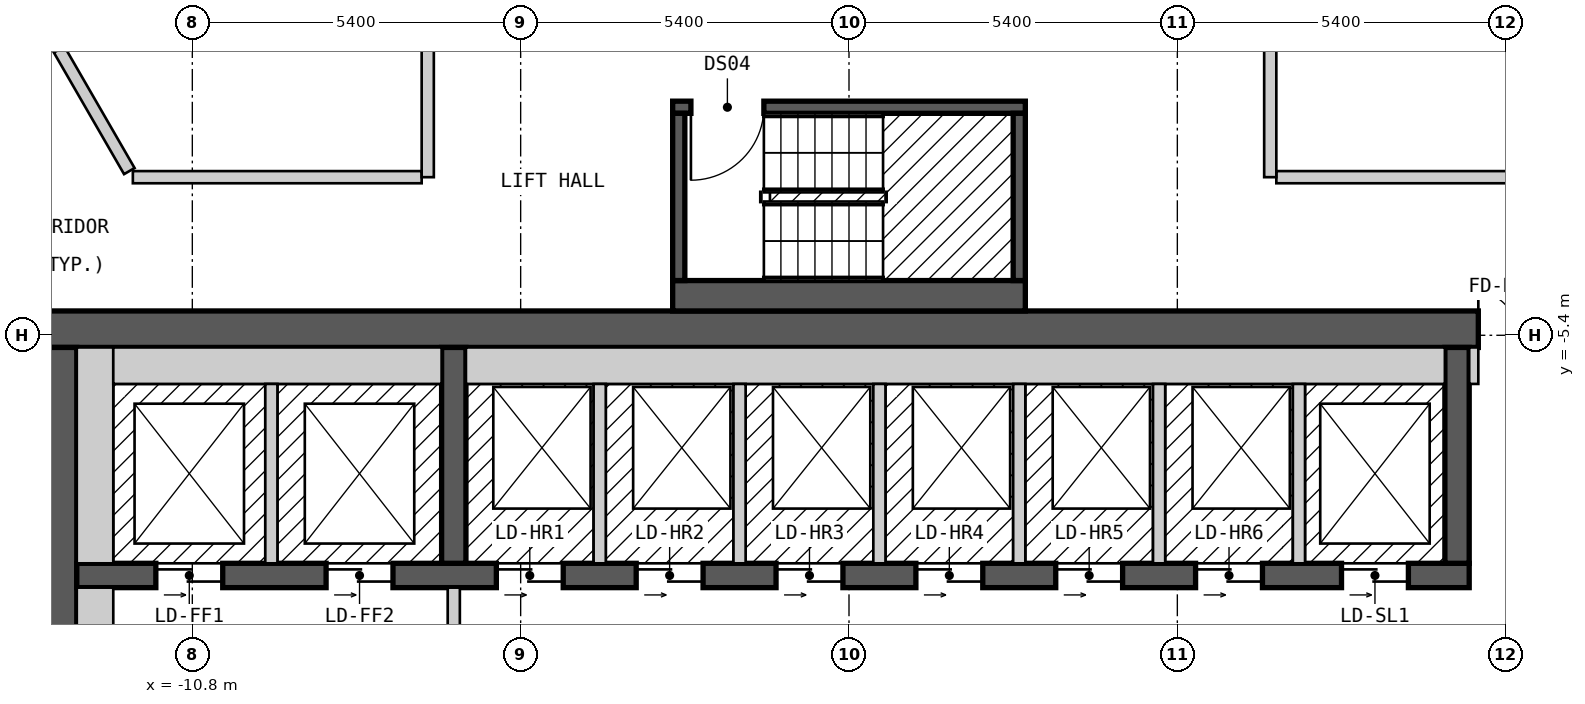
"""IFC4 building model, lengths in metres.
Left out: names, types, materials, properties, quantities, classifications, styles, units other than length and angle.
Written with IfcOpenShell. Run it as: python <this file> out.ifc"""

import sys

from ifc_helpers import new_model, si_unit, direction, frame, frame_2d, origin, place, context, subcontext, project, spatial, rectangle, extrude, element, fill, save


model = new_model("IFC4")
c1 = context("Model", 3, precision=1e-05, world=origin(), true_north=direction((0.0, 1.0)))
c2 = subcontext(c1, "Body", "Model", "MODEL_VIEW")
j1 = project(units=[si_unit("LENGTHUNIT", "METRE"), si_unit("PLANEANGLEUNIT", "RADIAN")], contexts=[c1])
p1 = place(None, origin())
s1 = spatial("IfcSite", under=j1, at=p1, CompositionType="ELEMENT")
p2 = place(p1, origin())
s2 = spatial("IfcBuilding", under=s1, at=p2, CompositionType="ELEMENT")
p3 = place(p2, frame((0.0, 0.0, 196.2)))
s3 = spatial("IfcBuildingStorey", under=s2, at=p3, CompositionType="ELEMENT", Elevation=196.2)
p4 = place(p3, frame((-13.3, -5.3, 0.0), z_axis=(0.0, 0.0, 1.0), x_axis=(1.0, 0.0, 0.0)))
e1 = element("IfcWall", 1, at=p4, inside=s3, PredefinedType="SHEAR", context=c2, shape_type="SweptSolid", body=[
    extrude(rectangle(XDim=26.6, YDim=0.6, at=frame_2d((13.3, 0.0))), origin(), (0.0, 0.0, 1.0), 2.6),
])
p5 = place(p4, frame((23.65, 0.0, 0.0)))
e2 = element("IfcOpeningElement", 2, at=p5, cuts=e1, PredefinedType="OPENING", context=c2, shape_type="SweptSolid", body=[
    extrude(rectangle(XDim=1.2, YDim=2.1, at=frame_2d((0.6, 1.05))), frame((0.0, 0.31, 0.0), z_axis=(0.0, -1.0, 0.0), x_axis=(1.0, 0.0, 0.0)), (0.0, 0.0, 1.0), 0.62),
])
p6 = place(p3, frame((-13.0, -18.4, 0.0), z_axis=(0.0, 0.0, 1.0), x_axis=(0.0, 1.0, 0.0)))
e3 = element("IfcWall", 3, at=p6, inside=s3, PredefinedType="SHEAR", context=c2, shape_type="SweptSolid", body=[
    extrude(rectangle(XDim=12.8, YDim=0.6, at=frame_2d((6.4, 0.0))), origin(), (0.0, 0.0, 1.0), 2.6),
])
p7 = place(p6, frame((4.2, 0.0, 0.0)))
e4 = element("IfcOpeningElement", 4, at=p7, cuts=e3, PredefinedType="OPENING", context=c2, shape_type="SweptSolid", body=[
    extrude(rectangle(XDim=1.2, YDim=2.1, at=frame_2d((0.6, 1.05))), frame((0.0, 0.31, 0.0), z_axis=(0.0, -1.0, 0.0), x_axis=(1.0, 0.0, 0.0)), (0.0, 0.0, 1.0), 0.62),
])
p8 = place(p3, frame((-12.7, -9.35, 0.0), z_axis=(0.0, 0.0, 1.0), x_axis=(1.0, 0.0, 0.0)))
e5 = element("IfcWall", 5, at=p8, inside=s3, PredefinedType="SHEAR", context=c2, shape_type="SweptSolid", body=[
    extrude(rectangle(XDim=22.9, YDim=0.4, at=frame_2d((11.45, 0.0))), origin(), (0.0, 0.0, 1.0), 2.6),
])
p9 = place(p8, frame((1.3, 0.0, 0.0)))
e6 = element("IfcOpeningElement", 6, at=p9, cuts=e5, PredefinedType="OPENING", context=c2, shape_type="SweptSolid", body=[
    extrude(rectangle(XDim=1.1, YDim=2.1, at=frame_2d((0.55, 1.05))), frame((0.0, 0.21, 0.0), z_axis=(0.0, -1.0, 0.0), x_axis=(1.0, 0.0, 0.0)), (0.0, 0.0, 1.0), 0.42),
])
p10 = place(p8, frame((4.1, 0.0, 0.0)))
e7 = element("IfcOpeningElement", 7, at=p10, cuts=e5, PredefinedType="OPENING", context=c2, shape_type="SweptSolid", body=[
    extrude(rectangle(XDim=1.1, YDim=2.1, at=frame_2d((0.55, 1.05))), frame((0.0, 0.21, 0.0), z_axis=(0.0, -1.0, 0.0), x_axis=(1.0, 0.0, 0.0)), (0.0, 0.0, 1.0), 0.42),
])
p11 = place(p8, frame((6.9, 0.0, 0.0)))
e8 = element("IfcOpeningElement", 8, at=p11, cuts=e5, PredefinedType="OPENING", context=c2, shape_type="SweptSolid", body=[
    extrude(rectangle(XDim=1.1, YDim=2.1, at=frame_2d((0.55, 1.05))), frame((0.0, 0.21, 0.0), z_axis=(0.0, -1.0, 0.0), x_axis=(1.0, 0.0, 0.0)), (0.0, 0.0, 1.0), 0.42),
])
p12 = place(p8, frame((9.2, 0.0, 0.0)))
e9 = element("IfcOpeningElement", 9, at=p12, cuts=e5, PredefinedType="OPENING", context=c2, shape_type="SweptSolid", body=[
    extrude(rectangle(XDim=1.1, YDim=2.1, at=frame_2d((0.55, 1.05))), frame((0.0, 0.21, 0.0), z_axis=(0.0, -1.0, 0.0), x_axis=(1.0, 0.0, 0.0)), (0.0, 0.0, 1.0), 0.42),
])
p13 = place(p8, frame((11.5, 0.0, 0.0)))
e10 = element("IfcOpeningElement", 10, at=p13, cuts=e5, PredefinedType="OPENING", context=c2, shape_type="SweptSolid", body=[
    extrude(rectangle(XDim=1.1, YDim=2.1, at=frame_2d((0.55, 1.05))), frame((0.0, 0.21, 0.0), z_axis=(0.0, -1.0, 0.0), x_axis=(1.0, 0.0, 0.0)), (0.0, 0.0, 1.0), 0.42),
])
p14 = place(p8, frame((13.8, 0.0, 0.0)))
e11 = element("IfcOpeningElement", 11, at=p14, cuts=e5, PredefinedType="OPENING", context=c2, shape_type="SweptSolid", body=[
    extrude(rectangle(XDim=1.1, YDim=2.1, at=frame_2d((0.55, 1.05))), frame((0.0, 0.21, 0.0), z_axis=(0.0, -1.0, 0.0), x_axis=(1.0, 0.0, 0.0)), (0.0, 0.0, 1.0), 0.42),
])
p15 = place(p8, frame((16.1, 0.0, 0.0)))
e12 = element("IfcOpeningElement", 12, at=p15, cuts=e5, PredefinedType="OPENING", context=c2, shape_type="SweptSolid", body=[
    extrude(rectangle(XDim=1.1, YDim=2.1, at=frame_2d((0.55, 1.05))), frame((0.0, 0.21, 0.0), z_axis=(0.0, -1.0, 0.0), x_axis=(1.0, 0.0, 0.0)), (0.0, 0.0, 1.0), 0.42),
])
p16 = place(p8, frame((18.4, 0.0, 0.0)))
e13 = element("IfcOpeningElement", 13, at=p16, cuts=e5, PredefinedType="OPENING", context=c2, shape_type="SweptSolid", body=[
    extrude(rectangle(XDim=1.1, YDim=2.1, at=frame_2d((0.55, 1.05))), frame((0.0, 0.21, 0.0), z_axis=(0.0, -1.0, 0.0), x_axis=(1.0, 0.0, 0.0)), (0.0, 0.0, 1.0), 0.42),
])
p17 = place(p8, frame((20.8, 0.0, 0.0)))
e14 = element("IfcOpeningElement", 14, at=p17, cuts=e5, PredefinedType="OPENING", context=c2, shape_type="SweptSolid", body=[
    extrude(rectangle(XDim=1.1, YDim=2.1, at=frame_2d((0.55, 1.05))), frame((0.0, 0.21, 0.0), z_axis=(0.0, -1.0, 0.0), x_axis=(1.0, 0.0, 0.0)), (0.0, 0.0, 1.0), 0.42),
])
for number, where, z_axis, x_axis in (
    (15, (-6.5, -9.15, 0.0), (0.0, 0.0, 1.0), (0.0, 1.0, 0.0)),
    (16, (10.0, -9.15, 0.0), (0.0, 0.0, 1.0), (0.0, 1.0, 0.0)),
):
    element("IfcWall", number, at=place(p3, frame(where, z_axis=z_axis, x_axis=x_axis)), inside=s3, PredefinedType="SHEAR", context=c2, shape_type="SweptSolid", body=[
        extrude(rectangle(XDim=3.55, YDim=0.4, at=frame_2d((1.775, 0.0))), origin(), (0.0, 0.0, 1.0), 2.6),
    ])
p18 = place(p3, frame((-2.9, -4.75, 0.0), z_axis=(0.0, 0.0, 1.0), x_axis=(1.0, 0.0, 0.0)))
e17 = element("IfcWall", 17, at=p18, inside=s3, PredefinedType="SOLIDWALL", context=c2, shape_type="SweptSolid", body=[
    extrude(rectangle(XDim=5.8, YDim=0.5, at=frame_2d((2.9, 0.0))), origin(), (0.0, 0.0, 1.0), 2.6),
])
p19 = place(p3, frame((-2.9, -1.65, 0.0), z_axis=(0.0, 0.0, 1.0), x_axis=(1.0, 0.0, 0.0)))
e18 = element("IfcWall", 18, at=p19, inside=s3, PredefinedType="SOLIDWALL", context=c2, shape_type="SweptSolid", body=[
    extrude(rectangle(XDim=5.8, YDim=0.2, at=frame_2d((2.9, 0.0))), origin(), (0.0, 0.0, 1.0), 2.6),
])
p20 = place(p19, frame((0.3, 0.0, 0.0)))
e19 = element("IfcOpeningElement", 19, at=p20, cuts=e18, PredefinedType="OPENING", context=c2, shape_type="SweptSolid", body=[
    extrude(rectangle(XDim=1.2, YDim=2.1, at=frame_2d((0.6, 1.05))), frame((0.0, 0.11, 0.0), z_axis=(0.0, -1.0, 0.0), x_axis=(1.0, 0.0, 0.0)), (0.0, 0.0, 1.0), 0.22),
])
for number, where, z_axis, x_axis in (
    (20, (-2.8, -4.5, 0.0), (0.0, 0.0, 1.0), (0.0, 1.0, 0.0)),
    (21, (2.8, -4.5, 0.0), (0.0, 0.0, 1.0), (0.0, 1.0, 0.0)),
):
    element("IfcWall", number, at=place(p3, frame(where, z_axis=z_axis, x_axis=x_axis)), inside=s3, PredefinedType="SOLIDWALL", context=c2, shape_type="SweptSolid", body=[
        extrude(rectangle(XDim=2.75, YDim=0.2, at=frame_2d((1.375, 0.0))), origin(), (0.0, 0.0, 1.0), 2.6),
    ])
p21 = place(p3, frame((-12.99, -0.701, 0.0), z_axis=(0.0, 0.0, 1.0), x_axis=(0.499972710878, -0.866041158593, 0.0)))
e22 = element("IfcWall", 22, at=p21, inside=s3, PredefinedType="PARTITIONING", context=c2, shape_type="SweptSolid", body=[
    extrude(rectangle(XDim=2.308, YDim=0.2, at=frame_2d((1.154, 0.0))), origin(), (0.0, 0.0, 1.0), 2.6),
])
p22 = place(p3, frame((-11.778, -2.8, 0.0), z_axis=(0.0, 0.0, 1.0), x_axis=(1.0, 0.0, 0.0)))
e23 = element("IfcWall", 23, at=p22, inside=s3, PredefinedType="PARTITIONING", context=c2, shape_type="SweptSolid", body=[
    extrude(rectangle(XDim=4.75, YDim=0.2, at=frame_2d((2.375, 0.0))), origin(), (0.0, 0.0, 1.0), 2.6),
])
p23 = place(p3, frame((7.028, -2.8, 0.0), z_axis=(0.0, 0.0, 1.0), x_axis=(1.0, 0.0, 0.0)))
e24 = element("IfcWall", 24, at=p23, inside=s3, PredefinedType="PARTITIONING", context=c2, shape_type="SweptSolid", body=[
    extrude(rectangle(XDim=4.634, YDim=0.2, at=frame_2d((2.317, 0.0))), origin(), (0.0, 0.0, 1.0), 2.6),
])
for number, where, z_axis, x_axis in (
    (25, (6.928, -2.8, 0.0), (0.0, 0.0, 1.0), (0.0, 1.0, 0.0)),
    (26, (-6.928, -2.8, 0.0), (0.0, 0.0, 1.0), (0.0, 1.0, 0.0)),
):
    element("IfcWall", number, at=place(p3, frame(where, z_axis=z_axis, x_axis=x_axis)), inside=s3, PredefinedType="PARTITIONING", context=c2, shape_type="SweptSolid", body=[
        extrude(rectangle(XDim=4.0, YDim=0.2, at=frame_2d((2.0, 0.0))), origin(), (0.0, 0.0, 1.0), 2.6),
    ])
p24 = place(p3, frame((-12.4, -13.0, 0.0), z_axis=(0.0, 0.0, 1.0), x_axis=(0.0, 1.0, 0.0)))
e27 = element("IfcWall", 27, at=p24, inside=s3, PredefinedType="PARTITIONING", context=c2, shape_type="SweptSolid", body=[
    extrude(rectangle(XDim=3.45, YDim=0.6, at=frame_2d((1.725, 0.0))), origin(), (0.0, 0.0, 1.0), 2.6),
])
p25 = place(p3, frame((-12.4, -9.15, 0.0), z_axis=(0.0, 0.0, 1.0), x_axis=(0.0, 1.0, 0.0)))
e28 = element("IfcWall", 28, at=p25, inside=s3, PredefinedType="SOLIDWALL", context=c2, shape_type="SweptSolid", body=[
    extrude(rectangle(XDim=3.55, YDim=0.6, at=frame_2d((1.775, 0.0))), origin(), (0.0, 0.0, 1.0), 2.6),
])
p26 = place(p3, frame((-12.1, -5.9, 0.0), z_axis=(0.0, 0.0, 1.0), x_axis=(1.0, 0.0, 0.0)))
e29 = element("IfcWall", 29, at=p26, inside=s3, PredefinedType="SOLIDWALL", context=c2, shape_type="SweptSolid", body=[
    extrude(rectangle(XDim=5.4, YDim=0.6, at=frame_2d((2.7, 0.0))), origin(), (0.0, 0.0, 1.0), 2.6),
])
p27 = place(p3, frame((-9.5, -9.15, 0.0), z_axis=(0.0, 0.0, 1.0), x_axis=(0.0, 1.0, 0.0)))
e30 = element("IfcWall", 30, at=p27, inside=s3, PredefinedType="SOLIDWALL", context=c2, shape_type="SweptSolid", body=[
    extrude(rectangle(XDim=2.95, YDim=0.2, at=frame_2d((1.475, 0.0))), origin(), (0.0, 0.0, 1.0), 2.6),
])
p28 = place(p3, frame((-6.5, -14.45, 0.0), z_axis=(0.0, 0.0, 1.0), x_axis=(0.0, 1.0, 0.0)))
e31 = element("IfcWall", 31, at=p28, inside=s3, PredefinedType="PARTITIONING", context=c2, shape_type="SweptSolid", body=[
    extrude(rectangle(XDim=4.9, YDim=0.2, at=frame_2d((2.45, 0.0))), origin(), (0.0, 0.0, 1.0), 2.6),
])
p29 = place(p28, frame((3.15, 0.0, 0.0), z_axis=(0.0, 0.0, 1.0), x_axis=(-1.0, 0.0, 0.0)))
e32 = element("IfcOpeningElement", 32, at=p29, cuts=e31, PredefinedType="OPENING", context=c2, shape_type="SweptSolid", body=[
    extrude(rectangle(XDim=1.4, YDim=2.1, at=frame_2d((0.7, 1.05))), frame((0.0, 0.11, 0.0), z_axis=(0.0, -1.0, 0.0), x_axis=(1.0, 0.0, 0.0)), (0.0, 0.0, 1.0), 0.22),
])
p30 = place(p3, frame((-6.3, -5.9, 0.0), z_axis=(0.0, 0.0, 1.0), x_axis=(1.0, 0.0, 0.0)))
e33 = element("IfcWall", 33, at=p30, inside=s3, PredefinedType="SOLIDWALL", context=c2, shape_type="SweptSolid", body=[
    extrude(rectangle(XDim=16.1, YDim=0.6, at=frame_2d((8.05, 0.0))), origin(), (0.0, 0.0, 1.0), 2.6),
])
for number, where, z_axis, x_axis in (
    (34, (-4.1, -9.15, 0.0), (0.0, 0.0, 1.0), (0.0, 1.0, 0.0)),
    (35, (-1.8, -9.15, 0.0), (0.0, 0.0, 1.0), (0.0, 1.0, 0.0)),
    (36, (0.5, -9.15, 0.0), (0.0, 0.0, 1.0), (0.0, 1.0, 0.0)),
    (37, (2.8, -9.15, 0.0), (0.0, 0.0, 1.0), (0.0, 1.0, 0.0)),
    (38, (5.1, -9.15, 0.0), (0.0, 0.0, 1.0), (0.0, 1.0, 0.0)),
    (39, (7.4, -9.15, 0.0), (0.0, 0.0, 1.0), (0.0, 1.0, 0.0)),
):
    element("IfcWall", number, at=place(p3, frame(where, z_axis=z_axis, x_axis=x_axis)), inside=s3, PredefinedType="SOLIDWALL", context=c2, shape_type="SweptSolid", body=[
        extrude(rectangle(XDim=2.95, YDim=0.2, at=frame_2d((1.475, 0.0))), origin(), (0.0, 0.0, 1.0), 2.6),
    ])
p31 = place(p3, frame((10.275, -6.2, 0.0), z_axis=(0.0, 0.0, 1.0), x_axis=(0.0, 1.0, 0.0)))
e40 = element("IfcWall", 40, at=p31, inside=s3, PredefinedType="PARTITIONING", context=c2, shape_type="SweptSolid", body=[
    extrude(rectangle(XDim=0.6, YDim=0.15, at=frame_2d((0.3, 0.0))), origin(), (0.0, 0.0, 1.0), 2.6),
])
p32 = place(p20, origin())
e41 = element("IfcDoor", 41, at=p32, inside=s3, OperationType="SINGLE_SWING_LEFT", PredefinedType="DOOR", context=c2, shape_type="SweptSolid", body=[
    extrude(rectangle(XDim=1.2, YDim=2.1, at=frame_2d((0.6, 1.05))), frame((0.0, 0.025, 0.0), z_axis=(0.0, -1.0, 0.0), x_axis=(1.0, 0.0, 0.0)), (0.0, 0.0, 1.0), 0.05),
])
fill(e19, e41)
p33 = place(p9, origin())
e42 = element("IfcDoor", 42, at=p33, inside=s3, OperationType="DOUBLE_DOOR_SLIDING", PredefinedType="DOOR", context=c2, shape_type="SweptSolid", body=[
    extrude(rectangle(XDim=1.1, YDim=2.1, at=frame_2d((0.55, 1.05))), frame((0.0, 0.025, 0.0), z_axis=(0.0, -1.0, 0.0), x_axis=(1.0, 0.0, 0.0)), (0.0, 0.0, 1.0), 0.05),
])
fill(e6, e42)
p34 = place(p10, origin())
e43 = element("IfcDoor", 43, at=p34, inside=s3, OperationType="DOUBLE_DOOR_SLIDING", PredefinedType="DOOR", context=c2, shape_type="SweptSolid", body=[
    extrude(rectangle(XDim=1.1, YDim=2.1, at=frame_2d((0.55, 1.05))), frame((0.0, 0.025, 0.0), z_axis=(0.0, -1.0, 0.0), x_axis=(1.0, 0.0, 0.0)), (0.0, 0.0, 1.0), 0.05),
])
fill(e7, e43)
p35 = place(p11, origin())
e44 = element("IfcDoor", 44, at=p35, inside=s3, OperationType="DOUBLE_DOOR_SLIDING", PredefinedType="DOOR", context=c2, shape_type="SweptSolid", body=[
    extrude(rectangle(XDim=1.1, YDim=2.1, at=frame_2d((0.55, 1.05))), frame((0.0, 0.025, 0.0), z_axis=(0.0, -1.0, 0.0), x_axis=(1.0, 0.0, 0.0)), (0.0, 0.0, 1.0), 0.05),
])
fill(e8, e44)
p36 = place(p12, origin())
e45 = element("IfcDoor", 45, at=p36, inside=s3, OperationType="DOUBLE_DOOR_SLIDING", PredefinedType="DOOR", context=c2, shape_type="SweptSolid", body=[
    extrude(rectangle(XDim=1.1, YDim=2.1, at=frame_2d((0.55, 1.05))), frame((0.0, 0.025, 0.0), z_axis=(0.0, -1.0, 0.0), x_axis=(1.0, 0.0, 0.0)), (0.0, 0.0, 1.0), 0.05),
])
fill(e9, e45)
p37 = place(p13, origin())
e46 = element("IfcDoor", 46, at=p37, inside=s3, OperationType="DOUBLE_DOOR_SLIDING", PredefinedType="DOOR", context=c2, shape_type="SweptSolid", body=[
    extrude(rectangle(XDim=1.1, YDim=2.1, at=frame_2d((0.55, 1.05))), frame((0.0, 0.025, 0.0), z_axis=(0.0, -1.0, 0.0), x_axis=(1.0, 0.0, 0.0)), (0.0, 0.0, 1.0), 0.05),
])
fill(e10, e46)
p38 = place(p14, origin())
e47 = element("IfcDoor", 47, at=p38, inside=s3, OperationType="DOUBLE_DOOR_SLIDING", PredefinedType="DOOR", context=c2, shape_type="SweptSolid", body=[
    extrude(rectangle(XDim=1.1, YDim=2.1, at=frame_2d((0.55, 1.05))), frame((0.0, 0.025, 0.0), z_axis=(0.0, -1.0, 0.0), x_axis=(1.0, 0.0, 0.0)), (0.0, 0.0, 1.0), 0.05),
])
fill(e11, e47)
p39 = place(p15, origin())
e48 = element("IfcDoor", 48, at=p39, inside=s3, OperationType="DOUBLE_DOOR_SLIDING", PredefinedType="DOOR", context=c2, shape_type="SweptSolid", body=[
    extrude(rectangle(XDim=1.1, YDim=2.1, at=frame_2d((0.55, 1.05))), frame((0.0, 0.025, 0.0), z_axis=(0.0, -1.0, 0.0), x_axis=(1.0, 0.0, 0.0)), (0.0, 0.0, 1.0), 0.05),
])
fill(e12, e48)
p40 = place(p16, origin())
e49 = element("IfcDoor", 49, at=p40, inside=s3, OperationType="DOUBLE_DOOR_SLIDING", PredefinedType="DOOR", context=c2, shape_type="SweptSolid", body=[
    extrude(rectangle(XDim=1.1, YDim=2.1, at=frame_2d((0.55, 1.05))), frame((0.0, 0.025, 0.0), z_axis=(0.0, -1.0, 0.0), x_axis=(1.0, 0.0, 0.0)), (0.0, 0.0, 1.0), 0.05),
])
fill(e13, e49)
p41 = place(p17, origin())
e50 = element("IfcDoor", 50, at=p41, inside=s3, OperationType="DOUBLE_DOOR_SLIDING", PredefinedType="DOOR", context=c2, shape_type="SweptSolid", body=[
    extrude(rectangle(XDim=1.1, YDim=2.1, at=frame_2d((0.55, 1.05))), frame((0.0, 0.025, 0.0), z_axis=(0.0, -1.0, 0.0), x_axis=(1.0, 0.0, 0.0)), (0.0, 0.0, 1.0), 0.05),
])
fill(e14, e50)
p42 = place(p5, origin())
e51 = element("IfcDoor", 51, at=p42, inside=s3, OperationType="DOUBLE_DOOR_SINGLE_SWING", PredefinedType="DOOR", context=c2, shape_type="SweptSolid", body=[
    extrude(rectangle(XDim=1.2, YDim=2.1, at=frame_2d((0.6, 1.05))), frame((0.0, 0.025, 0.0), z_axis=(0.0, -1.0, 0.0), x_axis=(1.0, 0.0, 0.0)), (0.0, 0.0, 1.0), 0.05),
])
fill(e2, e51)
save(model, sys.argv[1])
